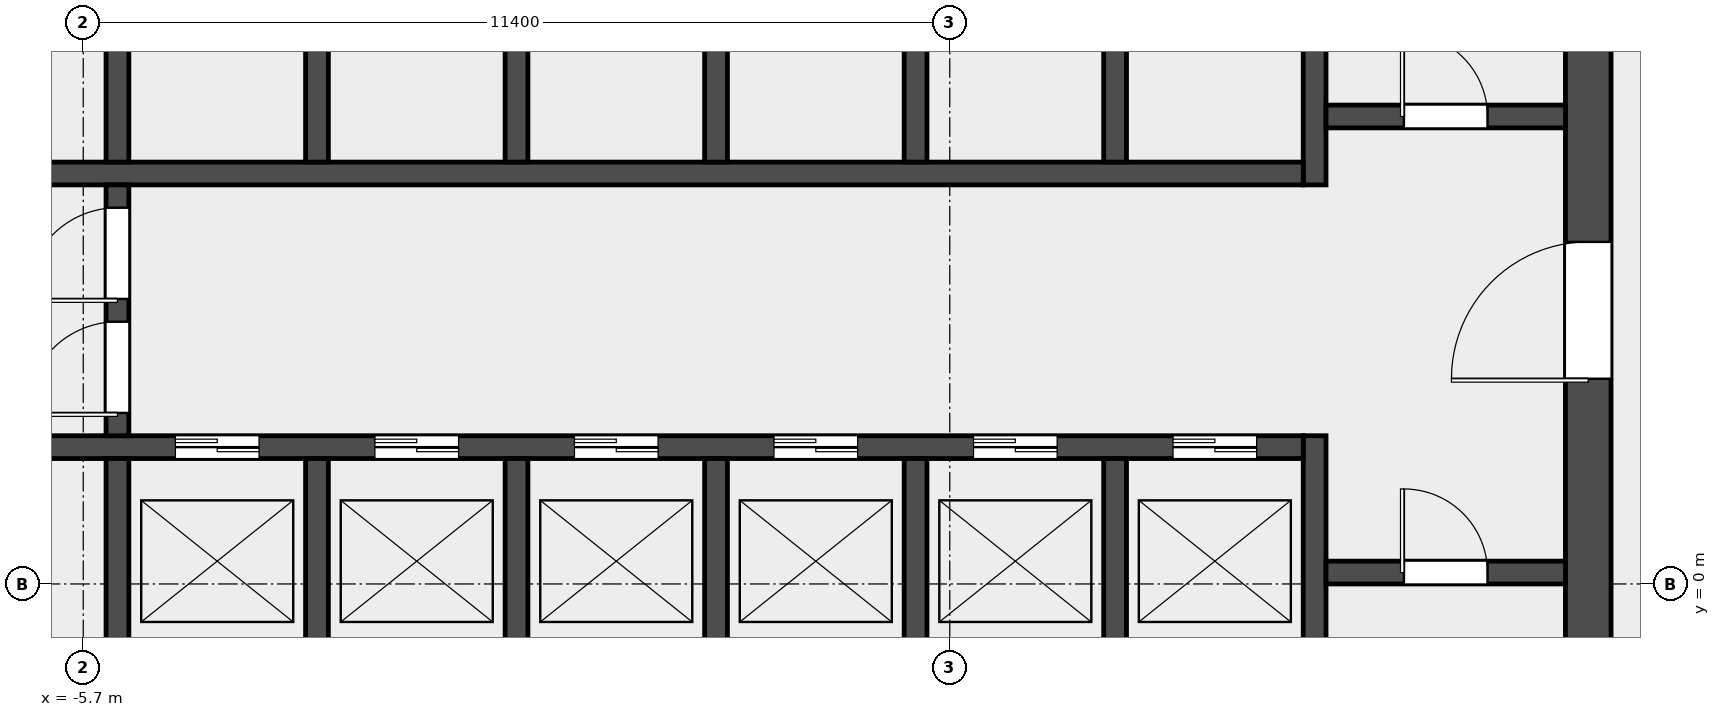
"""IFC4 building model, lengths in metres.
Left out: names, types, materials, properties, quantities, classifications, styles, units other than length and angle.
Written with IfcOpenShell. Run it as: python <this file> out.ifc"""

import sys

from ifc_helpers import new_model, si_unit, direction, frame, frame_2d, origin, place, context, subcontext, project, spatial, rectangle, extrude, element, fill, save


model = new_model("IFC4")
c1 = context("Model", 3, precision=1e-05, world=origin(), true_north=direction((0.0, 1.0)))
c2 = subcontext(c1, "Body", "Model", "MODEL_VIEW")
j1 = project(units=[si_unit("LENGTHUNIT", "METRE"), si_unit("PLANEANGLEUNIT", "RADIAN")], contexts=[c1])
p1 = place(None, origin())
s1 = spatial("IfcSite", under=j1, at=p1, CompositionType="ELEMENT")
p2 = place(p1, origin())
s2 = spatial("IfcBuilding", under=s1, at=p2, CompositionType="ELEMENT")
p3 = place(p2, frame((0.0, 0.0, 189.0)))
s3 = spatial("IfcBuildingStorey", under=s2, at=p3, CompositionType="ELEMENT", Elevation=189.0)
p4 = place(p3, frame((14.1, -6.6, 0.0), z_axis=(0.0, 0.0, 1.0), x_axis=(0.0, 1.0, 0.0)))
e1 = element("IfcWall", 1, at=p4, inside=s3, PredefinedType="SHEAR", context=c2, shape_type="SweptSolid", body=[
    extrude(rectangle(XDim=19.5, YDim=0.6, at=frame_2d((9.75, 0.0))), origin(), (0.0, 0.0, 1.0), 3.7),
])
p5 = place(p4, frame((9.3, 0.0, 0.0)))
e2 = element("IfcOpeningElement", 2, at=p5, cuts=e1, PredefinedType="OPENING", context=c2, shape_type="SweptSolid", body=[
    extrude(rectangle(XDim=1.8, YDim=2.1, at=frame_2d((0.9, 1.05))), frame((0.0, 0.312, 0.0), z_axis=(0.0, -1.0, 0.0), x_axis=(1.0, 0.0, 0.0)), (0.0, 0.0, 1.0), 0.624),
])
p6 = place(p3, frame((10.5, -6.6, 0.0), z_axis=(0.0, 0.0, 1.0), x_axis=(0.0, 1.0, 0.0)))
e3 = element("IfcWall", 3, at=p6, inside=s3, PredefinedType="SHEAR", context=c2, shape_type="SweptSolid", body=[
    extrude(rectangle(XDim=8.55, YDim=0.3, at=frame_2d((4.275, 0.0))), origin(), (0.0, 0.0, 1.0), 3.7),
])
p7 = place(p3, frame((10.5, 5.25, 0.0), z_axis=(0.0, 0.0, 1.0), x_axis=(0.0, 1.0, 0.0)))
e4 = element("IfcWall", 4, at=p7, inside=s3, PredefinedType="SHEAR", context=c2, shape_type="SweptSolid", body=[
    extrude(rectangle(XDim=7.65, YDim=0.3, at=frame_2d((3.825, 0.0))), origin(), (0.0, 0.0, 1.0), 3.7),
])
p8 = place(p3, frame((10.65, 0.15, 0.0), z_axis=(0.0, 0.0, 1.0), x_axis=(1.0, 0.0, 0.0)))
e5 = element("IfcWall", 5, at=p8, inside=s3, PredefinedType="SOLIDWALL", context=c2, shape_type="SweptSolid", body=[
    extrude(rectangle(XDim=3.15, YDim=0.3, at=frame_2d((1.575, 0.0))), origin(), (0.0, 0.0, 1.0), 3.7),
])
p9 = place(p8, frame((1.025, 0.0, 0.0)))
e6 = element("IfcOpeningElement", 6, at=p9, cuts=e5, PredefinedType="OPENING", context=c2, shape_type="SweptSolid", body=[
    extrude(rectangle(XDim=1.1, YDim=2.1, at=frame_2d((0.55, 1.05))), frame((0.0, 0.162, 0.0), z_axis=(0.0, -1.0, 0.0), x_axis=(1.0, 0.0, 0.0)), (0.0, 0.0, 1.0), 0.324),
])
p10 = place(p3, frame((10.65, 6.15, 0.0), z_axis=(0.0, 0.0, 1.0), x_axis=(1.0, 0.0, 0.0)))
e7 = element("IfcWall", 7, at=p10, inside=s3, PredefinedType="SOLIDWALL", context=c2, shape_type="SweptSolid", body=[
    extrude(rectangle(XDim=3.15, YDim=0.3, at=frame_2d((1.575, 0.0))), origin(), (0.0, 0.0, 1.0), 3.7),
])
p11 = place(p10, frame((1.025, 0.0, 0.0)))
e8 = element("IfcOpeningElement", 8, at=p11, cuts=e7, PredefinedType="OPENING", context=c2, shape_type="SweptSolid", body=[
    extrude(rectangle(XDim=1.1, YDim=2.1, at=frame_2d((0.55, 1.05))), frame((0.0, 0.162, 0.0), z_axis=(0.0, -1.0, 0.0), x_axis=(1.0, 0.0, 0.0)), (0.0, 0.0, 1.0), 0.324),
])
p12 = place(p3, frame((-10.35, 1.8, 0.0), z_axis=(0.0, 0.0, 1.0), x_axis=(1.0, 0.0, 0.0)))
e9 = element("IfcWall", 9, at=p12, inside=s3, PredefinedType="SOLIDWALL", context=c2, shape_type="SweptSolid", body=[
    extrude(rectangle(XDim=20.7, YDim=0.3, at=frame_2d((10.35, 0.0))), origin(), (0.0, 0.0, 1.0), 3.7),
])
p13 = place(p12, frame((0.512, 0.0, 0.0)))
e10 = element("IfcOpeningElement", 10, at=p13, cuts=e9, PredefinedType="OPENING", context=c2, shape_type="SweptSolid", body=[
    extrude(rectangle(XDim=1.3, YDim=2.1, at=frame_2d((0.65, 1.05))), frame((0.0, 0.162, 0.0), z_axis=(0.0, -1.0, 0.0), x_axis=(1.0, 0.0, 0.0)), (0.0, 0.0, 1.0), 0.324),
])
p14 = place(p12, frame((5.863, 0.0, 0.0)))
e11 = element("IfcOpeningElement", 11, at=p14, cuts=e9, PredefinedType="OPENING", context=c2, shape_type="SweptSolid", body=[
    extrude(rectangle(XDim=1.1, YDim=2.1, at=frame_2d((0.55, 1.05))), frame((0.0, 0.162, 0.0), z_axis=(0.0, -1.0, 0.0), x_axis=(1.0, 0.0, 0.0)), (0.0, 0.0, 1.0), 0.324),
])
p15 = place(p12, frame((8.488, 0.0, 0.0)))
e12 = element("IfcOpeningElement", 12, at=p15, cuts=e9, PredefinedType="OPENING", context=c2, shape_type="SweptSolid", body=[
    extrude(rectangle(XDim=1.1, YDim=2.1, at=frame_2d((0.55, 1.05))), frame((0.0, 0.162, 0.0), z_axis=(0.0, -1.0, 0.0), x_axis=(1.0, 0.0, 0.0)), (0.0, 0.0, 1.0), 0.324),
])
p16 = place(p12, frame((11.113, 0.0, 0.0)))
e13 = element("IfcOpeningElement", 13, at=p16, cuts=e9, PredefinedType="OPENING", context=c2, shape_type="SweptSolid", body=[
    extrude(rectangle(XDim=1.1, YDim=2.1, at=frame_2d((0.55, 1.05))), frame((0.0, 0.162, 0.0), z_axis=(0.0, -1.0, 0.0), x_axis=(1.0, 0.0, 0.0)), (0.0, 0.0, 1.0), 0.324),
])
p17 = place(p12, frame((13.738, 0.0, 0.0)))
e14 = element("IfcOpeningElement", 14, at=p17, cuts=e9, PredefinedType="OPENING", context=c2, shape_type="SweptSolid", body=[
    extrude(rectangle(XDim=1.1, YDim=2.1, at=frame_2d((0.55, 1.05))), frame((0.0, 0.162, 0.0), z_axis=(0.0, -1.0, 0.0), x_axis=(1.0, 0.0, 0.0)), (0.0, 0.0, 1.0), 0.324),
])
p18 = place(p12, frame((16.363, 0.0, 0.0)))
e15 = element("IfcOpeningElement", 15, at=p18, cuts=e9, PredefinedType="OPENING", context=c2, shape_type="SweptSolid", body=[
    extrude(rectangle(XDim=1.1, YDim=2.1, at=frame_2d((0.55, 1.05))), frame((0.0, 0.162, 0.0), z_axis=(0.0, -1.0, 0.0), x_axis=(1.0, 0.0, 0.0)), (0.0, 0.0, 1.0), 0.324),
])
p19 = place(p12, frame((18.988, 0.0, 0.0)))
e16 = element("IfcOpeningElement", 16, at=p19, cuts=e9, PredefinedType="OPENING", context=c2, shape_type="SweptSolid", body=[
    extrude(rectangle(XDim=1.1, YDim=2.1, at=frame_2d((0.55, 1.05))), frame((0.0, 0.162, 0.0), z_axis=(0.0, -1.0, 0.0), x_axis=(1.0, 0.0, 0.0)), (0.0, 0.0, 1.0), 0.324),
])
p20 = place(p3, frame((-10.35, 5.4, 0.0), z_axis=(0.0, 0.0, 1.0), x_axis=(1.0, 0.0, 0.0)))
e17 = element("IfcWall", 17, at=p20, inside=s3, PredefinedType="SOLIDWALL", context=c2, shape_type="SweptSolid", body=[
    extrude(rectangle(XDim=20.7, YDim=0.3, at=frame_2d((10.35, 0.0))), origin(), (0.0, 0.0, 1.0), 3.7),
])
p21 = place(p20, frame((0.512, 0.0, 0.0)))
e18 = element("IfcOpeningElement", 18, at=p21, cuts=e17, PredefinedType="OPENING", context=c2, shape_type="SweptSolid", body=[
    extrude(rectangle(XDim=1.3, YDim=2.1, at=frame_2d((0.65, 1.05))), frame((0.0, 0.162, 0.0), z_axis=(0.0, -1.0, 0.0), x_axis=(1.0, 0.0, 0.0)), (0.0, 0.0, 1.0), 0.324),
])
for number, where, z_axis, x_axis in (
    (19, (-5.25, -1.05, 0.0), (0.0, 0.0, 1.0), (0.0, 1.0, 0.0)),
    (20, (-2.625, -1.05, 0.0), (0.0, 0.0, 1.0), (0.0, 1.0, 0.0)),
    (21, (0.0, -1.05, 0.0), (0.0, 0.0, 1.0), (0.0, 1.0, 0.0)),
    (22, (2.625, -1.05, 0.0), (0.0, 0.0, 1.0), (0.0, 1.0, 0.0)),
    (23, (5.25, -1.05, 0.0), (0.0, 0.0, 1.0), (0.0, 1.0, 0.0)),
    (24, (7.875, -1.05, 0.0), (0.0, 0.0, 1.0), (0.0, 1.0, 0.0)),
    (25, (-5.25, 5.55, 0.0), (0.0, 0.0, 1.0), (0.0, 1.0, 0.0)),
    (26, (-2.625, 5.55, 0.0), (0.0, 0.0, 1.0), (0.0, 1.0, 0.0)),
    (27, (0.0, 5.55, 0.0), (0.0, 0.0, 1.0), (0.0, 1.0, 0.0)),
    (28, (2.625, 5.55, 0.0), (0.0, 0.0, 1.0), (0.0, 1.0, 0.0)),
    (29, (5.25, 5.55, 0.0), (0.0, 0.0, 1.0), (0.0, 1.0, 0.0)),
    (30, (7.875, 5.55, 0.0), (0.0, 0.0, 1.0), (0.0, 1.0, 0.0)),
):
    element("IfcWall", number, at=place(p3, frame(where, z_axis=z_axis, x_axis=x_axis)), inside=s3, PredefinedType="SOLIDWALL", context=c2, shape_type="SweptSolid", body=[
        extrude(rectangle(XDim=2.7, YDim=0.3, at=frame_2d((1.35, 0.0))), origin(), (0.0, 0.0, 1.0), 3.7),
    ])
p22 = place(p3, frame((-5.25, 1.95, 0.0), z_axis=(0.0, 0.0, 1.0), x_axis=(0.0, 1.0, 0.0)))
e31 = element("IfcWall", 31, at=p22, inside=s3, PredefinedType="SOLIDWALL", context=c2, shape_type="SweptSolid", body=[
    extrude(rectangle(XDim=3.3, YDim=0.3, at=frame_2d((1.65, 0.0))), origin(), (0.0, 0.0, 1.0), 3.7),
])
p23 = place(p22, frame((0.3, 0.0, 0.0)))
e32 = element("IfcOpeningElement", 32, at=p23, cuts=e31, PredefinedType="OPENING", context=c2, shape_type="SweptSolid", body=[
    extrude(rectangle(XDim=1.2, YDim=2.1, at=frame_2d((0.6, 1.05))), frame((0.0, 0.162, 0.0), z_axis=(0.0, -1.0, 0.0), x_axis=(1.0, 0.0, 0.0)), (0.0, 0.0, 1.0), 0.324),
])
p24 = place(p22, frame((1.8, 0.0, 0.0)))
e33 = element("IfcOpeningElement", 33, at=p24, cuts=e31, PredefinedType="OPENING", context=c2, shape_type="SweptSolid", body=[
    extrude(rectangle(XDim=1.2, YDim=2.1, at=frame_2d((0.6, 1.05))), frame((0.0, 0.162, 0.0), z_axis=(0.0, -1.0, 0.0), x_axis=(1.0, 0.0, 0.0)), (0.0, 0.0, 1.0), 0.324),
])
p25 = place(p9, origin())
e34 = element("IfcDoor", 34, at=p25, inside=s3, OperationType="SINGLE_SWING_RIGHT", PredefinedType="DOOR", context=c2, shape_type="SweptSolid", body=[
    extrude(rectangle(XDim=1.1, YDim=2.1, at=frame_2d((0.55, 1.05))), frame((0.0, 0.025, 0.0), z_axis=(0.0, -1.0, 0.0), x_axis=(1.0, 0.0, 0.0)), (0.0, 0.0, 1.0), 0.05),
])
fill(e6, e34)
p26 = place(p11, origin())
e35 = element("IfcDoor", 35, at=p26, inside=s3, OperationType="SINGLE_SWING_RIGHT", PredefinedType="DOOR", context=c2, shape_type="SweptSolid", body=[
    extrude(rectangle(XDim=1.1, YDim=2.1, at=frame_2d((0.55, 1.05))), frame((0.0, 0.025, 0.0), z_axis=(0.0, -1.0, 0.0), x_axis=(1.0, 0.0, 0.0)), (0.0, 0.0, 1.0), 0.05),
])
fill(e8, e35)
p27 = place(p5, origin())
e36 = element("IfcDoor", 36, at=p27, inside=s3, OperationType="DOUBLE_DOOR_SINGLE_SWING", PredefinedType="DOOR", context=c2, shape_type="SweptSolid", body=[
    extrude(rectangle(XDim=1.8, YDim=2.1, at=frame_2d((0.9, 1.05))), frame((0.0, 0.025, 0.0), z_axis=(0.0, -1.0, 0.0), x_axis=(1.0, 0.0, 0.0)), (0.0, 0.0, 1.0), 0.05),
])
fill(e2, e36)
p28 = place(p23, origin())
e37 = element("IfcDoor", 37, at=p28, inside=s3, OperationType="SINGLE_SWING_LEFT", PredefinedType="DOOR", context=c2, shape_type="SweptSolid", body=[
    extrude(rectangle(XDim=1.2, YDim=2.1, at=frame_2d((0.6, 1.05))), frame((0.0, 0.025, 0.0), z_axis=(0.0, -1.0, 0.0), x_axis=(1.0, 0.0, 0.0)), (0.0, 0.0, 1.0), 0.05),
])
fill(e32, e37)
p29 = place(p24, origin())
e38 = element("IfcDoor", 38, at=p29, inside=s3, OperationType="SINGLE_SWING_RIGHT", PredefinedType="DOOR", context=c2, shape_type="SweptSolid", body=[
    extrude(rectangle(XDim=1.2, YDim=2.1, at=frame_2d((0.6, 1.05))), frame((0.0, 0.025, 0.0), z_axis=(0.0, -1.0, 0.0), x_axis=(1.0, 0.0, 0.0)), (0.0, 0.0, 1.0), 0.05),
])
fill(e33, e38)
p30 = place(p14, origin())
e39 = element("IfcDoor", 39, at=p30, inside=s3, OperationType="DOUBLE_DOOR_SLIDING", PredefinedType="DOOR", context=c2, shape_type="SweptSolid", body=[
    extrude(rectangle(XDim=1.1, YDim=2.1, at=frame_2d((0.55, 1.05))), frame((0.0, 0.025, 0.0), z_axis=(0.0, -1.0, 0.0), x_axis=(1.0, 0.0, 0.0)), (0.0, 0.0, 1.0), 0.05),
])
fill(e11, e39)
p31 = place(p15, origin())
e40 = element("IfcDoor", 40, at=p31, inside=s3, OperationType="DOUBLE_DOOR_SLIDING", PredefinedType="DOOR", context=c2, shape_type="SweptSolid", body=[
    extrude(rectangle(XDim=1.1, YDim=2.1, at=frame_2d((0.55, 1.05))), frame((0.0, 0.025, 0.0), z_axis=(0.0, -1.0, 0.0), x_axis=(1.0, 0.0, 0.0)), (0.0, 0.0, 1.0), 0.05),
])
fill(e12, e40)
p32 = place(p16, origin())
e41 = element("IfcDoor", 41, at=p32, inside=s3, OperationType="DOUBLE_DOOR_SLIDING", PredefinedType="DOOR", context=c2, shape_type="SweptSolid", body=[
    extrude(rectangle(XDim=1.1, YDim=2.1, at=frame_2d((0.55, 1.05))), frame((0.0, 0.025, 0.0), z_axis=(0.0, -1.0, 0.0), x_axis=(1.0, 0.0, 0.0)), (0.0, 0.0, 1.0), 0.05),
])
fill(e13, e41)
p33 = place(p17, origin())
e42 = element("IfcDoor", 42, at=p33, inside=s3, OperationType="DOUBLE_DOOR_SLIDING", PredefinedType="DOOR", context=c2, shape_type="SweptSolid", body=[
    extrude(rectangle(XDim=1.1, YDim=2.1, at=frame_2d((0.55, 1.05))), frame((0.0, 0.025, 0.0), z_axis=(0.0, -1.0, 0.0), x_axis=(1.0, 0.0, 0.0)), (0.0, 0.0, 1.0), 0.05),
])
fill(e14, e42)
p34 = place(p18, origin())
e43 = element("IfcDoor", 43, at=p34, inside=s3, OperationType="DOUBLE_DOOR_SLIDING", PredefinedType="DOOR", context=c2, shape_type="SweptSolid", body=[
    extrude(rectangle(XDim=1.1, YDim=2.1, at=frame_2d((0.55, 1.05))), frame((0.0, 0.025, 0.0), z_axis=(0.0, -1.0, 0.0), x_axis=(1.0, 0.0, 0.0)), (0.0, 0.0, 1.0), 0.05),
])
fill(e15, e43)
p35 = place(p19, origin())
e44 = element("IfcDoor", 44, at=p35, inside=s3, OperationType="DOUBLE_DOOR_SLIDING", PredefinedType="DOOR", context=c2, shape_type="SweptSolid", body=[
    extrude(rectangle(XDim=1.1, YDim=2.1, at=frame_2d((0.55, 1.05))), frame((0.0, 0.025, 0.0), z_axis=(0.0, -1.0, 0.0), x_axis=(1.0, 0.0, 0.0)), (0.0, 0.0, 1.0), 0.05),
])
fill(e16, e44)
save(model, sys.argv[1])
